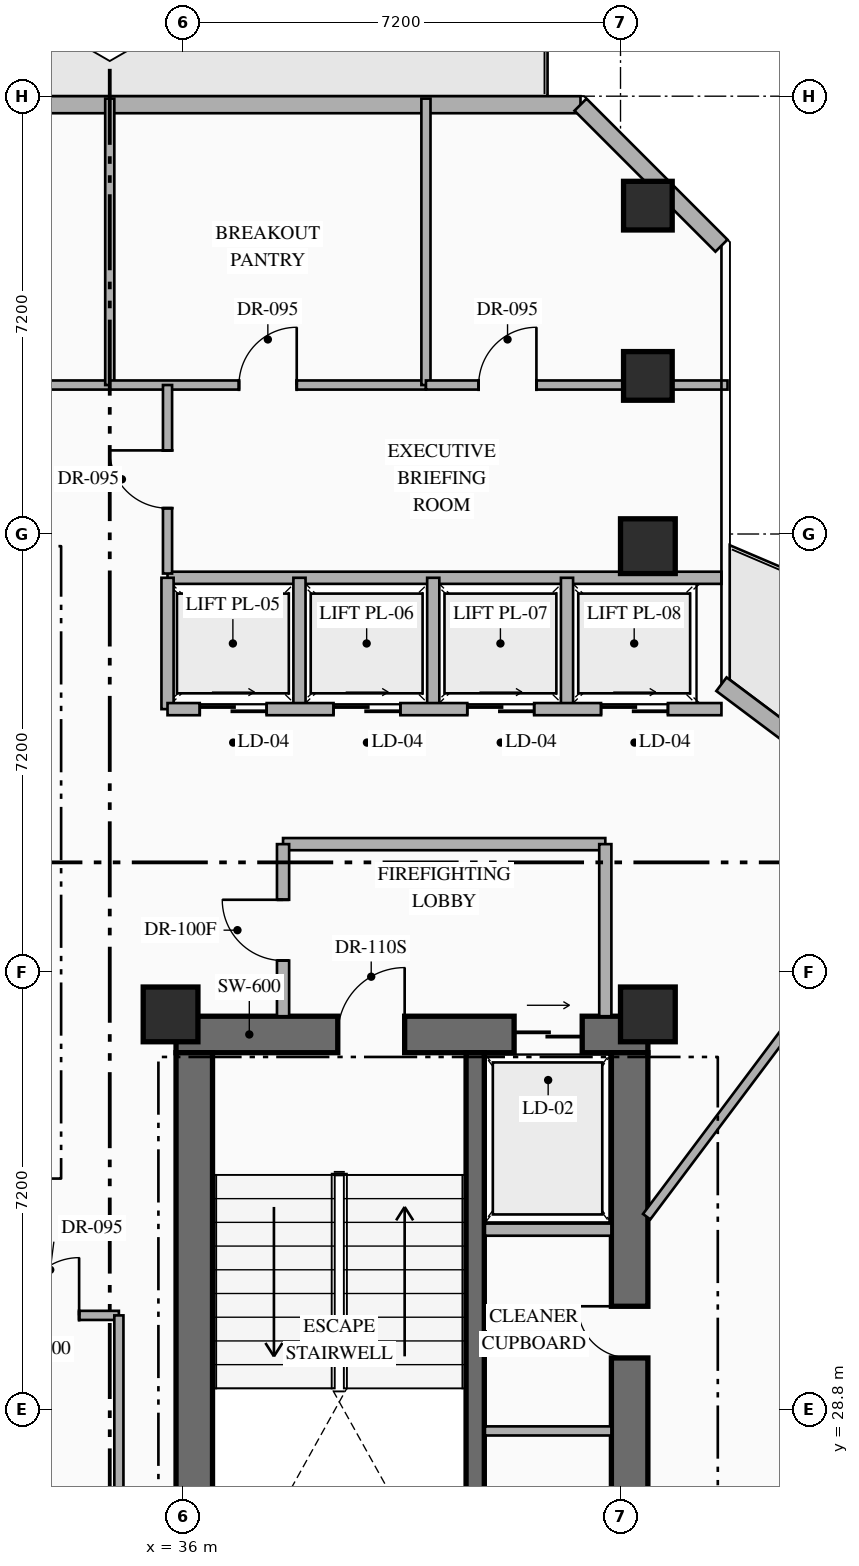
"""IFC4 building model, lengths in metres.
Left out: names, types, materials, properties, quantities, classifications, styles, units other than length and angle.
Written with IfcOpenShell. Run it as: python <this file> out.ifc"""

import sys

from ifc_helpers import new_model, si_unit, direction, frame, frame_2d, origin, origin_2d, place, context, subcontext, project, spatial, rectangle, hollow_rectangle, extrude, element, fill, save


model = new_model("IFC4")
c1 = context("Model", 3, precision=1e-05, world=origin(), true_north=direction((0.0, 1.0)))
c2 = subcontext(c1, "Body", "Model", "MODEL_VIEW")
j1 = project(units=[si_unit("LENGTHUNIT", "METRE"), si_unit("PLANEANGLEUNIT", "RADIAN")], contexts=[c1])
p1 = place(None, origin())
s1 = spatial("IfcSite", under=j1, at=p1, CompositionType="ELEMENT")
p2 = place(p1, origin())
s2 = spatial("IfcBuilding", under=s1, at=p2, CompositionType="ELEMENT")
p3 = place(p2, frame((0.0, 0.0, 167.25)))
s3 = spatial("IfcBuildingStorey", under=s2, at=p3, CompositionType="ELEMENT", Elevation=167.25)
p4 = place(p3, frame((35.89, 34.97, 0.0), z_axis=(0.0, 0.0, 1.0), x_axis=(1.0, 0.0, 0.0)))
e1 = element("IfcWall", 1, at=p4, inside=s3, PredefinedType="SHEAR", context=c2, shape_type="SweptSolid", body=[
    extrude(rectangle(XDim=7.76, YDim=0.6, at=frame_2d((3.88, 0.0))), origin(), (0.0, 0.0, 1.0), 3.6),
])
p5 = place(p4, frame((2.66, 0.0, 0.0)))
e2 = element("IfcOpeningElement", 2, at=p5, cuts=e1, PredefinedType="OPENING", context=c2, shape_type="SweptSolid", body=[
    extrude(rectangle(XDim=1.1, YDim=2.2, at=frame_2d((0.55, 1.1))), frame((0.0, 0.31, 0.0), z_axis=(0.0, -1.0, 0.0), x_axis=(1.0, 0.0, 0.0)), (0.0, 0.0, 1.0), 0.62),
])
p6 = place(p4, frame((5.56, 0.0, 0.0)))
e3 = element("IfcOpeningElement", 3, at=p6, cuts=e1, PredefinedType="OPENING", context=c2, shape_type="SweptSolid", body=[
    extrude(rectangle(XDim=1.12, YDim=2.15, at=frame_2d((0.56, 1.075))), frame((0.0, 0.31, 0.0), z_axis=(0.0, -1.0, 0.0), x_axis=(1.0, 0.0, 0.0)), (0.0, 0.0, 1.0), 0.62),
])
p7 = place(p3, frame((36.19, 25.19, 0.0), z_axis=(0.0, 0.0, 1.0), x_axis=(0.0, 1.0, 0.0)))
e4 = element("IfcWall", 4, at=p7, inside=s3, PredefinedType="SHEAR", context=c2, shape_type="SweptSolid", body=[
    extrude(rectangle(XDim=9.48, YDim=0.6, at=frame_2d((4.74, 0.0))), origin(), (0.0, 0.0, 1.0), 3.6),
])
p8 = place(p3, frame((43.35, 25.19, 0.0), z_axis=(0.0, 0.0, 1.0), x_axis=(0.0, 1.0, 0.0)))
e5 = element("IfcWall", 5, at=p8, inside=s3, PredefinedType="SHEAR", context=c2, shape_type="SweptSolid", body=[
    extrude(rectangle(XDim=9.48, YDim=0.6, at=frame_2d((4.74, 0.0))), origin(), (0.0, 0.0, 1.0), 3.6),
])
p9 = place(p8, frame((1.21, 0.0, 0.0)))
e6 = element("IfcOpeningElement", 6, at=p9, cuts=e5, PredefinedType="OPENING", context=c2, shape_type="SweptSolid", body=[
    extrude(rectangle(XDim=0.85, YDim=2.08, at=frame_2d((0.425, 1.04))), frame((0.0, 0.31, 0.0), z_axis=(0.0, -1.0, 0.0), x_axis=(1.0, 0.0, 0.0)), (0.0, 0.0, 1.0), 0.62),
])
p10 = place(p8, frame((4.46, 0.0, 0.0)))
e7 = element("IfcOpeningElement", 7, at=p10, cuts=e5, PredefinedType="OPENING", context=c2, shape_type="SweptSolid", body=[
    extrude(rectangle(XDim=0.85, YDim=2.08, at=frame_2d((0.425, 1.04))), frame((0.0, 0.31, 0.0), z_axis=(0.0, -1.0, 0.0), x_axis=(1.0, 0.0, 0.0)), (0.0, 0.0, 1.0), 0.62),
])
p11 = place(p3, frame((40.81, 25.19, 0.0), z_axis=(0.0, 0.0, 1.0), x_axis=(0.0, 1.0, 0.0)))
e8 = element("IfcWall", 8, at=p11, inside=s3, PredefinedType="SHEAR", context=c2, shape_type="SweptSolid", body=[
    extrude(rectangle(XDim=9.48, YDim=0.3, at=frame_2d((4.74, 0.0))), origin(), (0.0, 0.0, 1.0), 3.6),
])
for number, where, z_axis, x_axis in (
    (9, (35.8, 35.3, 0.0), (0.0, 0.0, 1.0), (1.0, 0.0, 0.0)),
    (10, (43.65, 35.3, 0.0), (0.0, 0.0, 1.0), (1.0, 0.0, 0.0)),
    (11, (43.65, 43.0, 0.0), (0.0, 0.0, 1.0), (1.0, 0.0, 0.0)),
):
    element("IfcColumn", number, at=place(p3, frame(where, z_axis=z_axis, x_axis=x_axis)), inside=s3, PredefinedType="COLUMN", context=c2, shape_type="SweptSolid", body=[
        extrude(rectangle(XDim=0.9, YDim=0.9, at=origin_2d()), origin(), (0.0, 0.0, 1.0), 3.6),
    ])
for number, where, z_axis, x_axis in (
    (12, (43.65, 45.8, 0.0), (0.0, 0.0, 1.0), (1.0, 0.0, 0.0)),
    (13, (43.65, 48.6, 0.0), (0.0, 0.0, 1.0), (1.0, 0.0, 0.0)),
):
    element("IfcColumn", number, at=place(p3, frame(where, z_axis=z_axis, x_axis=x_axis)), inside=s3, PredefinedType="COLUMN", context=c2, shape_type="SweptSolid", body=[
        extrude(hollow_rectangle(XDim=0.8, YDim=0.8, WallThickness=0.032, at=origin_2d()), origin(), (0.0, 0.0, 1.0), 3.6),
    ])
p12 = place(p3, frame((44.86, 40.73, 0.0), z_axis=(0.0, 0.0, 1.0), x_axis=(0.800007624502, -0.599989833863, 0.0)))
e14 = element("IfcWall", 14, at=p12, inside=s3, PredefinedType="STANDARD", context=c2, shape_type="SweptSolid", body=[
    extrude(rectangle(XDim=19.212, YDim=0.28, at=frame_2d((9.606, 0.0))), origin(), (0.0, 0.0, 1.0), 3.35),
])
p13 = place(p12, frame((1.755, 0.0, 0.0)))
e15 = element("IfcOpeningElement", 15, at=p13, cuts=e14, PredefinedType="OPENING", context=c2, shape_type="SweptSolid", body=[
    extrude(rectangle(XDim=1.1, YDim=2.2, at=frame_2d((0.55, 1.1))), frame((0.0, 0.15, 0.0), z_axis=(0.0, -1.0, 0.0), x_axis=(1.0, 0.0, 0.0)), (0.0, 0.0, 1.0), 0.3),
])
p14 = place(p12, frame((13.509, 0.0, 0.85)))
e16 = element("IfcOpeningElement", 16, at=p14, cuts=e14, PredefinedType="OPENING", context=c2, shape_type="SweptSolid", body=[
    extrude(rectangle(XDim=1.8, YDim=2.1, at=frame_2d((0.9, 1.05))), frame((0.0, 0.15, 0.0), z_axis=(0.0, -1.0, 0.0), x_axis=(1.0, 0.0, 0.0)), (0.0, 0.0, 1.0), 0.3),
])
p15 = place(p3, frame((12.058, 50.26, 0.0), z_axis=(0.0, 0.0, 1.0), x_axis=(1.0, 0.0, 0.0)))
e17 = element("IfcWall", 17, at=p15, inside=s3, PredefinedType="STANDARD", context=c2, shape_type="SweptSolid", body=[
    extrude(rectangle(XDim=30.484, YDim=0.28, at=frame_2d((15.242, 0.0))), origin(), (0.0, 0.0, 1.0), 3.35),
])
p16 = place(p15, frame((14.992, 0.0, 0.0)))
e18 = element("IfcOpeningElement", 18, at=p16, cuts=e17, PredefinedType="OPENING", context=c2, shape_type="SweptSolid", body=[
    extrude(rectangle(XDim=1.1, YDim=2.2, at=frame_2d((0.55, 1.1))), frame((0.0, 0.15, 0.0), z_axis=(0.0, -1.0, 0.0), x_axis=(1.0, 0.0, 0.0)), (0.0, 0.0, 1.0), 0.3),
])
p17 = place(p15, frame((10.074, 0.0, 0.85)))
e19 = element("IfcOpeningElement", 19, at=p17, cuts=e17, PredefinedType="OPENING", context=c2, shape_type="SweptSolid", body=[
    extrude(rectangle(XDim=1.8, YDim=2.1, at=frame_2d((0.9, 1.05))), frame((0.0, 0.15, 0.0), z_axis=(0.0, -1.0, 0.0), x_axis=(1.0, 0.0, 0.0)), (0.0, 0.0, 1.0), 0.3),
])
p18 = place(p3, frame((42.542, 50.26, 0.0), z_axis=(0.0, 0.0, 1.0), x_axis=(0.707106781187, -0.707106781187, 0.0)))
e20 = element("IfcWall", 20, at=p18, inside=s3, PredefinedType="STANDARD", context=c2, shape_type="SweptSolid", body=[
    extrude(rectangle(XDim=3.278, YDim=0.28, at=frame_2d((1.639, 0.0))), origin(), (0.0, 0.0, 1.0), 3.35),
])
p19 = place(p3, frame((40.97, 31.76, 0.0), z_axis=(0.0, 0.0, 1.0), x_axis=(1.0, 0.0, 0.0)))
e21 = element("IfcWall", 21, at=p19, inside=s3, PredefinedType="STANDARD", context=c2, shape_type="SweptSolid", body=[
    extrude(rectangle(XDim=2.08, YDim=0.2, at=frame_2d((1.04, 0.0))), origin(), (0.0, 0.0, 1.0), 3.35),
])
p20 = place(p3, frame((40.97, 28.45, 0.0), z_axis=(0.0, 0.0, 1.0), x_axis=(1.0, 0.0, 0.0)))
e22 = element("IfcWall", 22, at=p20, inside=s3, PredefinedType="PARTITIONING", context=c2, shape_type="SweptSolid", body=[
    extrude(rectangle(XDim=2.08, YDim=0.15, at=frame_2d((1.04, 0.0))), origin(), (0.0, 0.0, 1.0), 3.35),
])
p21 = place(p3, frame((37.65, 38.1, 0.0), z_axis=(0.0, 0.0, 1.0), x_axis=(1.0, 0.0, 0.0)))
e23 = element("IfcWall", 23, at=p21, inside=s3, PredefinedType="STANDARD", context=c2, shape_type="SweptSolid", body=[
    extrude(rectangle(XDim=5.3, YDim=0.2, at=frame_2d((2.65, 0.0))), origin(), (0.0, 0.0, 1.0), 3.35),
])
p22 = place(p3, frame((42.95, 35.27, 0.0), z_axis=(0.0, 0.0, 1.0), x_axis=(0.0, 1.0, 0.0)))
e24 = element("IfcWall", 24, at=p22, inside=s3, PredefinedType="STANDARD", context=c2, shape_type="SweptSolid", body=[
    extrude(rectangle(XDim=2.83, YDim=0.2, at=frame_2d((1.415, 0.0))), origin(), (0.0, 0.0, 1.0), 3.35),
])
p23 = place(p3, frame((37.65, 35.27, 0.0), z_axis=(0.0, 0.0, 1.0), x_axis=(0.0, 1.0, 0.0)))
e25 = element("IfcWall", 25, at=p23, inside=s3, PredefinedType="STANDARD", context=c2, shape_type="SweptSolid", body=[
    extrude(rectangle(XDim=2.83, YDim=0.2, at=frame_2d((1.415, 0.0))), origin(), (0.0, 0.0, 1.0), 3.35),
])
p24 = place(p23, frame((0.915, 0.0, 0.0)))
e26 = element("IfcOpeningElement", 26, at=p24, cuts=e25, PredefinedType="OPENING", context=c2, shape_type="SweptSolid", body=[
    extrude(rectangle(XDim=1.0, YDim=2.2, at=frame_2d((0.5, 1.1))), frame((0.0, 0.11, 0.0), z_axis=(0.0, -1.0, 0.0), x_axis=(1.0, 0.0, 0.0)), (0.0, 0.0, 1.0), 0.22),
])
p25 = place(p3, frame((35.75, 42.48, 0.0), z_axis=(0.0, 0.0, 1.0), x_axis=(1.0, 0.0, 0.0)))
e27 = element("IfcWall", 27, at=p25, inside=s3, PredefinedType="STANDARD", context=c2, shape_type="SweptSolid", body=[
    extrude(rectangle(XDim=9.11, YDim=0.2, at=frame_2d((4.555, 0.0))), origin(), (0.0, 0.0, 1.0), 3.35),
])
for number, where, z_axis, x_axis in (
    (28, (35.75, 40.32, 0.0), (0.0, 0.0, 1.0), (0.0, 1.0, 0.0)),
    (29, (37.92, 40.32, 0.0), (0.0, 0.0, 1.0), (0.0, 1.0, 0.0)),
    (30, (40.12, 40.32, 0.0), (0.0, 0.0, 1.0), (0.0, 1.0, 0.0)),
    (31, (42.32, 40.32, 0.0), (0.0, 0.0, 1.0), (0.0, 1.0, 0.0)),
):
    element("IfcWall", number, at=place(p3, frame(where, z_axis=z_axis, x_axis=x_axis)), inside=s3, PredefinedType="STANDARD", context=c2, shape_type="SweptSolid", body=[
        extrude(rectangle(XDim=2.16, YDim=0.2, at=frame_2d((1.08, 0.0))), origin(), (0.0, 0.0, 1.0), 3.35),
    ])
p26 = place(p3, frame((35.75, 40.32, 0.0), z_axis=(0.0, 0.0, 1.0), x_axis=(1.0, 0.0, 0.0)))
e32 = element("IfcWall", 32, at=p26, inside=s3, PredefinedType="STANDARD", context=c2, shape_type="SweptSolid", body=[
    extrude(rectangle(XDim=9.11, YDim=0.2, at=frame_2d((4.555, 0.0))), origin(), (0.0, 0.0, 1.0), 3.35),
])
p27 = place(p26, frame((0.53, 0.0, 0.0)))
e33 = element("IfcOpeningElement", 33, at=p27, cuts=e32, PredefinedType="OPENING", context=c2, shape_type="SweptSolid", body=[
    extrude(rectangle(XDim=1.1, YDim=2.18, at=frame_2d((0.55, 1.09))), frame((0.0, 0.11, 0.0), z_axis=(0.0, -1.0, 0.0), x_axis=(1.0, 0.0, 0.0)), (0.0, 0.0, 1.0), 0.22),
])
p28 = place(p26, frame((2.73, 0.0, 0.0)))
e34 = element("IfcOpeningElement", 34, at=p28, cuts=e32, PredefinedType="OPENING", context=c2, shape_type="SweptSolid", body=[
    extrude(rectangle(XDim=1.1, YDim=2.18, at=frame_2d((0.55, 1.09))), frame((0.0, 0.11, 0.0), z_axis=(0.0, -1.0, 0.0), x_axis=(1.0, 0.0, 0.0)), (0.0, 0.0, 1.0), 0.22),
])
p29 = place(p26, frame((4.93, 0.0, 0.0)))
e35 = element("IfcOpeningElement", 35, at=p29, cuts=e32, PredefinedType="OPENING", context=c2, shape_type="SweptSolid", body=[
    extrude(rectangle(XDim=1.1, YDim=2.18, at=frame_2d((0.55, 1.09))), frame((0.0, 0.11, 0.0), z_axis=(0.0, -1.0, 0.0), x_axis=(1.0, 0.0, 0.0)), (0.0, 0.0, 1.0), 0.22),
])
p30 = place(p26, frame((7.13, 0.0, 0.0)))
e36 = element("IfcOpeningElement", 36, at=p30, cuts=e32, PredefinedType="OPENING", context=c2, shape_type="SweptSolid", body=[
    extrude(rectangle(XDim=1.1, YDim=2.18, at=frame_2d((0.55, 1.09))), frame((0.0, 0.11, 0.0), z_axis=(0.0, -1.0, 0.0), x_axis=(1.0, 0.0, 0.0)), (0.0, 0.0, 1.0), 0.22),
])
p31 = place(p3, frame((30.5, 30.35, 0.0), z_axis=(0.0, 0.0, 1.0), x_axis=(1.0, 0.0, 0.0)))
e37 = element("IfcWall", 37, at=p31, inside=s3, PredefinedType="PARTITIONING", context=c2, shape_type="SweptSolid", body=[
    extrude(rectangle(XDim=4.45, YDim=0.15, at=frame_2d((2.225, 0.0))), origin(), (0.0, 0.0, 1.0), 3.35),
])
p32 = place(p31, frame((2.846, 0.0, 0.0)))
e38 = element("IfcOpeningElement", 38, at=p32, cuts=e37, PredefinedType="OPENING", context=c2, shape_type="SweptSolid", body=[
    extrude(rectangle(XDim=0.95, YDim=2.15, at=frame_2d((0.475, 1.075))), frame((0.0, 0.085, 0.0), z_axis=(0.0, -1.0, 0.0), x_axis=(1.0, 0.0, 0.0)), (0.0, 0.0, 1.0), 0.17),
])
p33 = place(p3, frame((34.95, 23.2, 0.0), z_axis=(0.0, 0.0, 1.0), x_axis=(0.0, 1.0, 0.0)))
e39 = element("IfcWall", 39, at=p33, inside=s3, PredefinedType="PARTITIONING", context=c2, shape_type="SweptSolid", body=[
    extrude(rectangle(XDim=7.15, YDim=0.15, at=frame_2d((3.575, 0.0))), origin(), (0.0, 0.0, 1.0), 3.35),
])
p34 = place(p3, frame((29.6, 45.65, 0.0), z_axis=(0.0, 0.0, 1.0), x_axis=(1.0, 0.0, 0.0)))
e40 = element("IfcWall", 40, at=p34, inside=s3, PredefinedType="PARTITIONING", context=c2, shape_type="SweptSolid", body=[
    extrude(rectangle(XDim=5.2, YDim=0.15, at=frame_2d((2.6, 0.0))), origin(), (0.0, 0.0, 1.0), 2.695),
])
p35 = place(p34, frame((0.903, 0.0, 0.0)))
e41 = element("IfcOpeningElement", 41, at=p35, cuts=e40, PredefinedType="OPENING", context=c2, shape_type="SweptSolid", body=[
    extrude(rectangle(XDim=0.95, YDim=2.15, at=frame_2d((0.475, 1.075))), frame((0.0, 0.085, 0.0), z_axis=(0.0, -1.0, 0.0), x_axis=(1.0, 0.0, 0.0)), (0.0, 0.0, 1.0), 0.17),
])
p36 = place(p3, frame((34.8, 45.65, 0.0), z_axis=(0.0, 0.0, 1.0), x_axis=(0.0, 1.0, 0.0)))
e42 = element("IfcWall", 42, at=p36, inside=s3, PredefinedType="PARTITIONING", context=c2, shape_type="SweptSolid", body=[
    extrude(rectangle(XDim=4.71, YDim=0.15, at=frame_2d((2.355, 0.0))), origin(), (0.0, 0.0, 1.0), 3.35),
])
p37 = place(p3, frame((34.8, 45.65, 0.0), z_axis=(0.0, 0.0, 1.0), x_axis=(1.0, 0.0, 0.0)))
e43 = element("IfcWall", 43, at=p37, inside=s3, PredefinedType="PARTITIONING", context=c2, shape_type="SweptSolid", body=[
    extrude(rectangle(XDim=5.2, YDim=0.15, at=frame_2d((2.6, 0.0))), origin(), (0.0, 0.0, 1.0), 2.695),
])
p38 = place(p37, frame((2.125, 0.0, 0.0)))
e44 = element("IfcOpeningElement", 44, at=p38, cuts=e43, PredefinedType="OPENING", context=c2, shape_type="SweptSolid", body=[
    extrude(rectangle(XDim=0.95, YDim=2.15, at=frame_2d((0.475, 1.075))), frame((0.0, 0.085, 0.0), z_axis=(0.0, -1.0, 0.0), x_axis=(1.0, 0.0, 0.0)), (0.0, 0.0, 1.0), 0.17),
])
p39 = place(p3, frame((40.0, 45.65, 0.0), z_axis=(0.0, 0.0, 1.0), x_axis=(0.0, 1.0, 0.0)))
e45 = element("IfcWall", 45, at=p39, inside=s3, PredefinedType="PARTITIONING", context=c2, shape_type="SweptSolid", body=[
    extrude(rectangle(XDim=4.71, YDim=0.15, at=frame_2d((2.355, 0.0))), origin(), (0.0, 0.0, 1.0), 3.35),
])
p40 = place(p3, frame((40.0, 45.65, 0.0), z_axis=(0.0, 0.0, 1.0), x_axis=(1.0, 0.0, 0.0)))
e46 = element("IfcWall", 46, at=p40, inside=s3, PredefinedType="PARTITIONING", context=c2, shape_type="SweptSolid", body=[
    extrude(rectangle(XDim=4.96, YDim=0.15, at=frame_2d((2.48, 0.0))), origin(), (0.0, 0.0, 1.0), 2.695),
])
p41 = place(p40, frame((0.867, 0.0, 0.0)))
e47 = element("IfcOpeningElement", 47, at=p41, cuts=e46, PredefinedType="OPENING", context=c2, shape_type="SweptSolid", body=[
    extrude(rectangle(XDim=0.95, YDim=2.15, at=frame_2d((0.475, 1.075))), frame((0.0, 0.085, 0.0), z_axis=(0.0, -1.0, 0.0), x_axis=(1.0, 0.0, 0.0)), (0.0, 0.0, 1.0), 0.17),
])
p42 = place(p3, frame((43.63, 31.973, 0.0), z_axis=(0.0, 0.0, 1.0), x_axis=(0.599975099311, 0.800018674911, 0.0)))
e48 = element("IfcWall", 48, at=p42, inside=s3, PredefinedType="PARTITIONING", context=c2, shape_type="SweptSolid", body=[
    extrude(rectangle(XDim=7.844, YDim=0.15, at=frame_2d((3.922, 0.0))), origin(), (0.0, 0.0, 1.0), 3.35),
])
p43 = place(p3, frame((35.75, 42.55, 0.0), z_axis=(0.0, 0.0, 1.0), x_axis=(0.0, 1.0, 0.0)))
e49 = element("IfcWall", 49, at=p43, inside=s3, PredefinedType="PARTITIONING", context=c2, shape_type="SweptSolid", body=[
    extrude(rectangle(XDim=3.1, YDim=0.15, at=frame_2d((1.55, 0.0))), origin(), (0.0, 0.0, 1.0), 3.35),
])
p44 = place(p43, frame((1.075, 0.0, 0.0)))
e50 = element("IfcOpeningElement", 50, at=p44, cuts=e49, PredefinedType="OPENING", context=c2, shape_type="SweptSolid", body=[
    extrude(rectangle(XDim=0.95, YDim=2.15, at=frame_2d((0.475, 1.075))), frame((0.0, 0.085, 0.0), z_axis=(0.0, -1.0, 0.0), x_axis=(1.0, 0.0, 0.0)), (0.0, 0.0, 1.0), 0.17),
])
p45 = place(p5, origin())
e51 = element("IfcDoor", 51, at=p45, inside=s3, OperationType="SINGLE_SWING_RIGHT", PredefinedType="DOOR", context=c2, shape_type="SweptSolid", body=[
    extrude(rectangle(XDim=1.1, YDim=2.2, at=frame_2d((0.55, 1.1))), frame((0.0, 0.025, 0.0), z_axis=(0.0, -1.0, 0.0), x_axis=(1.0, 0.0, 0.0)), (0.0, 0.0, 1.0), 0.05),
])
fill(e2, e51)
p46 = place(p6, origin())
e52 = element("IfcDoor", 52, at=p46, inside=s3, OperationType="SLIDING_TO_RIGHT", PredefinedType="USERDEFINED", context=c2, shape_type="SweptSolid", body=[
    extrude(rectangle(XDim=1.12, YDim=2.15, at=frame_2d((0.56, 1.075))), frame((0.0, 0.025, 0.0), z_axis=(0.0, -1.0, 0.0), x_axis=(1.0, 0.0, 0.0)), (0.0, 0.0, 1.0), 0.05),
])
fill(e3, e52)
p47 = place(p10, origin())
e53 = element("IfcDoor", 53, at=p47, inside=s3, OperationType="SINGLE_SWING_RIGHT", PredefinedType="DOOR", context=c2, shape_type="SweptSolid", body=[
    extrude(rectangle(XDim=0.85, YDim=2.08, at=frame_2d((0.425, 1.04))), frame((0.0, 0.025, 0.0), z_axis=(0.0, -1.0, 0.0), x_axis=(1.0, 0.0, 0.0)), (0.0, 0.0, 1.0), 0.05),
])
fill(e7, e53)
p48 = place(p24, origin())
e54 = element("IfcDoor", 54, at=p48, inside=s3, OperationType="SINGLE_SWING_RIGHT", PredefinedType="DOOR", context=c2, shape_type="SweptSolid", body=[
    extrude(rectangle(XDim=1.0, YDim=2.2, at=frame_2d((0.5, 1.1))), frame((0.0, 0.025, 0.0), z_axis=(0.0, -1.0, 0.0), x_axis=(1.0, 0.0, 0.0)), (0.0, 0.0, 1.0), 0.05),
])
fill(e26, e54)
p49 = place(p27, origin())
e55 = element("IfcDoor", 55, at=p49, inside=s3, OperationType="SLIDING_TO_RIGHT", PredefinedType="USERDEFINED", context=c2, shape_type="SweptSolid", body=[
    extrude(rectangle(XDim=1.1, YDim=2.18, at=frame_2d((0.55, 1.09))), frame((0.0, 0.025, 0.0), z_axis=(0.0, -1.0, 0.0), x_axis=(1.0, 0.0, 0.0)), (0.0, 0.0, 1.0), 0.05),
])
fill(e33, e55)
p50 = place(p28, origin())
e56 = element("IfcDoor", 56, at=p50, inside=s3, OperationType="SLIDING_TO_RIGHT", PredefinedType="USERDEFINED", context=c2, shape_type="SweptSolid", body=[
    extrude(rectangle(XDim=1.1, YDim=2.18, at=frame_2d((0.55, 1.09))), frame((0.0, 0.025, 0.0), z_axis=(0.0, -1.0, 0.0), x_axis=(1.0, 0.0, 0.0)), (0.0, 0.0, 1.0), 0.05),
])
fill(e34, e56)
p51 = place(p29, origin())
e57 = element("IfcDoor", 57, at=p51, inside=s3, OperationType="SLIDING_TO_RIGHT", PredefinedType="USERDEFINED", context=c2, shape_type="SweptSolid", body=[
    extrude(rectangle(XDim=1.1, YDim=2.18, at=frame_2d((0.55, 1.09))), frame((0.0, 0.025, 0.0), z_axis=(0.0, -1.0, 0.0), x_axis=(1.0, 0.0, 0.0)), (0.0, 0.0, 1.0), 0.05),
])
fill(e35, e57)
p52 = place(p30, origin())
e58 = element("IfcDoor", 58, at=p52, inside=s3, OperationType="SLIDING_TO_RIGHT", PredefinedType="USERDEFINED", context=c2, shape_type="SweptSolid", body=[
    extrude(rectangle(XDim=1.1, YDim=2.18, at=frame_2d((0.55, 1.09))), frame((0.0, 0.025, 0.0), z_axis=(0.0, -1.0, 0.0), x_axis=(1.0, 0.0, 0.0)), (0.0, 0.0, 1.0), 0.05),
])
fill(e36, e58)
p53 = place(p32, origin())
e59 = element("IfcDoor", 59, at=p53, inside=s3, OperationType="SINGLE_SWING_RIGHT", PredefinedType="DOOR", context=c2, shape_type="SweptSolid", body=[
    extrude(rectangle(XDim=0.95, YDim=2.15, at=frame_2d((0.475, 1.075))), frame((0.0, 0.025, 0.0), z_axis=(0.0, -1.0, 0.0), x_axis=(1.0, 0.0, 0.0)), (0.0, 0.0, 1.0), 0.05),
])
fill(e38, e59)
p54 = place(p38, origin())
e60 = element("IfcDoor", 60, at=p54, inside=s3, OperationType="SINGLE_SWING_RIGHT", PredefinedType="DOOR", context=c2, shape_type="SweptSolid", body=[
    extrude(rectangle(XDim=0.95, YDim=2.15, at=frame_2d((0.475, 1.075))), frame((0.0, 0.025, 0.0), z_axis=(0.0, -1.0, 0.0), x_axis=(1.0, 0.0, 0.0)), (0.0, 0.0, 1.0), 0.05),
])
fill(e44, e60)
p55 = place(p41, origin())
e61 = element("IfcDoor", 61, at=p55, inside=s3, OperationType="SINGLE_SWING_RIGHT", PredefinedType="DOOR", context=c2, shape_type="SweptSolid", body=[
    extrude(rectangle(XDim=0.95, YDim=2.15, at=frame_2d((0.475, 1.075))), frame((0.0, 0.025, 0.0), z_axis=(0.0, -1.0, 0.0), x_axis=(1.0, 0.0, 0.0)), (0.0, 0.0, 1.0), 0.05),
])
fill(e47, e61)
p56 = place(p44, origin())
e62 = element("IfcDoor", 62, at=p56, inside=s3, OperationType="SINGLE_SWING_RIGHT", PredefinedType="DOOR", context=c2, shape_type="SweptSolid", body=[
    extrude(rectangle(XDim=0.95, YDim=2.15, at=frame_2d((0.475, 1.075))), frame((0.0, 0.025, 0.0), z_axis=(0.0, -1.0, 0.0), x_axis=(1.0, 0.0, 0.0)), (0.0, 0.0, 1.0), 0.05),
])
fill(e50, e62)
save(model, sys.argv[1])
